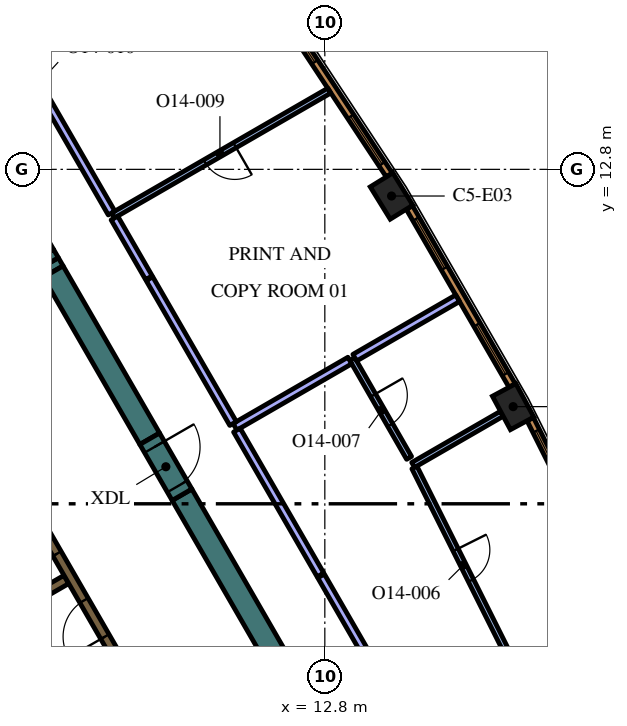
"""IFC4 building model, lengths in metres.
Left out: names, types, materials, properties, quantities, classifications, styles, units other than length and angle.
Written with IfcOpenShell. Run it as: python <this file> out.ifc"""

import sys

from ifc_helpers import new_model, si_unit, direction, frame, frame_2d, origin, origin_2d, place, context, subcontext, project, spatial, polyline, rectangle, outline, extrude, element, fill, save


model = new_model("IFC4")
c1 = context("Model", 3, precision=1e-05, world=origin(), true_north=direction((0.0, 1.0)))
c2 = subcontext(c1, "Body", "Model", "MODEL_VIEW")
j1 = project(units=[si_unit("LENGTHUNIT", "METRE"), si_unit("PLANEANGLEUNIT", "RADIAN")], contexts=[c1])
p1 = place(None, origin())
s1 = spatial("IfcSite", under=j1, at=p1, CompositionType="ELEMENT")
p2 = place(p1, origin())
s2 = spatial("IfcBuilding", under=s1, at=p2, CompositionType="ELEMENT")
p3 = place(p2, frame((0.0, 0.0, 304.8)))
s3 = spatial("IfcBuildingStorey", under=s2, at=p3, CompositionType="ELEMENT", Elevation=304.8)
for number, where, z_axis, x_axis in (
    (1, (17.756, 6.557, 0.0), (0.0, 0.0, 1.0), (-0.474, 0.881, 0.0)),
    (2, (14.556, 12.098, 0.0), (0.0, 0.0, 1.0), (-0.526, 0.851, 0.0)),
):
    element("IfcColumn", number, at=place(p3, frame(where, z_axis=z_axis, x_axis=x_axis)), inside=s3, PredefinedType="COLUMN", context=c2, shape_type="SweptSolid", body=[
        extrude(rectangle(XDim=1.0, YDim=0.7, at=origin_2d()), origin(), (0.0, 0.0, 1.0), 4.2),
    ])
p4 = place(p3, frame((9.042, 4.239, 0.0), z_axis=(0.0, 0.0, 1.0), x_axis=(0.500005785455, -0.866022063525, 0.0)))
e3 = element("IfcWall", 3, at=p4, inside=s3, PredefinedType="SOLIDWALL", context=c2, shape_type="SweptSolid", body=[
    extrude(rectangle(XDim=12.406, YDim=0.6, at=frame_2d((6.203, 0.0))), origin(), (0.0, 0.0, 1.0), 4.2),
])
p5 = place(p3, frame((5.529, 10.324, 0.0), z_axis=(0.0, 0.0, 1.0), x_axis=(0.499122205112, -0.866531606097, 0.0)))
e4 = element("IfcWall", 4, at=p5, inside=s3, PredefinedType="SOLIDWALL", context=c2, shape_type="SweptSolid", body=[
    extrude(rectangle(XDim=0.247, YDim=0.6, at=frame_2d((0.123, 0.0))), origin(), (0.0, 0.0, 1.0), 4.2),
])
p6 = place(p3, frame((1.989, 16.456, 0.0), z_axis=(0.0, 0.0, 1.0), x_axis=(0.499973159588, -0.866040899549, 0.0)))
e5 = element("IfcWall", 5, at=p6, inside=s3, PredefinedType="SOLIDWALL", context=c2, shape_type="SweptSolid", body=[
    extrude(rectangle(XDim=6.828, YDim=0.6, at=frame_2d((3.414, 0.0))), origin(), (0.0, 0.0, 1.0), 4.2),
])
p7 = place(p3, origin())
e6 = element("IfcWall", 6, at=p7, inside=s3, PredefinedType="SOLIDWALL", context=c2, shape_type="SweptSolid", body=[
    extrude(outline(polyline([(5.664, 10.691), (5.788, 10.476), (5.432, 10.271), (5.308, 10.486), (5.664, 10.691)])), origin(), (0.0, 0.0, 1.0), 4.2),
])
p8 = place(p3, frame((8.192, 5.711, 0.0), z_axis=(0.0, 0.0, 1.0), x_axis=(-0.500006836656, 0.866021456604, 0.0)))
e7 = element("IfcWall", 7, at=p8, inside=s3, PredefinedType="SOLIDWALL", context=c2, shape_type="SweptSolid", body=[
    extrude(rectangle(XDim=5.078, YDim=0.6, at=frame_2d((2.539, 0.0))), origin(), (0.0, 0.0, 1.0), 4.2),
])
p9 = place(p3, frame((5.97, -2.591, 0.0), z_axis=(0.0, 0.0, 1.0), x_axis=(-0.499994469932, 0.866028596547, 0.0)))
e8 = element("IfcWall", 8, at=p9, inside=s3, PredefinedType="SOLIDWALL", context=c2, shape_type="SweptSolid", body=[
    extrude(rectangle(XDim=10.488, YDim=0.25, at=frame_2d((5.244, 0.0))), origin(), (0.0, 0.0, 1.0), 4.2),
])
p10 = place(p3, frame((4.094, 0.909, 0.0), z_axis=(0.0, 0.0, 1.0), x_axis=(0.866008176907, 0.50002983664, 0.0)))
e9 = element("IfcWall", 9, at=p10, inside=s3, PredefinedType="SOLIDWALL", context=c2, shape_type="SweptSolid", body=[
    extrude(rectangle(XDim=2.2, YDim=0.25, at=frame_2d((1.1, 0.0))), origin(), (0.0, 0.0, 1.0), 4.2),
])
p11 = place(p3, frame((8.565, -2.185, 0.0), z_axis=(0.0, 0.0, 1.0), x_axis=(-0.499997954832, 0.866026584559, 0.0)))
e10 = element("IfcWall", 10, at=p11, inside=s3, PredefinedType="SOLIDWALL", context=c2, shape_type="SweptSolid", body=[
    extrude(rectangle(XDim=12.35, YDim=0.25, at=frame_2d((6.175, 0.0))), origin(), (0.0, 0.0, 1.0), 4.2),
])
p12 = place(p11, frame((0.685, 0.0, 0.0)))
e11 = element("IfcOpeningElement", 11, at=p12, cuts=e10, PredefinedType="OPENING", context=c2, shape_type="SweptSolid", body=[
    extrude(rectangle(XDim=0.9, YDim=2.1, at=frame_2d((0.45, 1.05))), frame((0.0, 0.135, 0.0), z_axis=(0.0, -1.0, 0.0), x_axis=(1.0, 0.0, 0.0)), (0.0, 0.0, 1.0), 0.27),
])
p13 = place(p11, frame((3.105, 0.0, 0.0)))
e12 = element("IfcOpeningElement", 12, at=p13, cuts=e10, PredefinedType="OPENING", context=c2, shape_type="SweptSolid", body=[
    extrude(rectangle(XDim=1.1, YDim=2.1, at=frame_2d((0.55, 1.05))), frame((0.0, 0.135, 0.0), z_axis=(0.0, -1.0, 0.0), x_axis=(1.0, 0.0, 0.0)), (0.0, 0.0, 1.0), 0.27),
])
p14 = place(p11, frame((5.625, 0.0, 0.0)))
e13 = element("IfcOpeningElement", 13, at=p14, cuts=e10, PredefinedType="OPENING", context=c2, shape_type="SweptSolid", body=[
    extrude(rectangle(XDim=1.1, YDim=2.1, at=frame_2d((0.55, 1.05))), frame((0.0, 0.135, 0.0), z_axis=(0.0, -1.0, 0.0), x_axis=(1.0, 0.0, 0.0)), (0.0, 0.0, 1.0), 0.27),
])
p15 = place(p11, frame((8.145, 0.0, 0.0)))
e14 = element("IfcOpeningElement", 14, at=p15, cuts=e10, PredefinedType="OPENING", context=c2, shape_type="SweptSolid", body=[
    extrude(rectangle(XDim=1.1, YDim=2.1, at=frame_2d((0.55, 1.05))), frame((0.0, 0.135, 0.0), z_axis=(0.0, -1.0, 0.0), x_axis=(1.0, 0.0, 0.0)), (0.0, 0.0, 1.0), 0.27),
])
p16 = place(p11, frame((10.665, 0.0, 0.0)))
e15 = element("IfcOpeningElement", 15, at=p16, cuts=e10, PredefinedType="OPENING", context=c2, shape_type="SweptSolid", body=[
    extrude(rectangle(XDim=1.1, YDim=2.1, at=frame_2d((0.55, 1.05))), frame((0.0, 0.135, 0.0), z_axis=(0.0, -1.0, 0.0), x_axis=(1.0, 0.0, 0.0)), (0.0, 0.0, 1.0), 0.27),
])
p17 = place(p3, frame((8.192, 5.711, 0.0), z_axis=(0.0, 0.0, 1.0), x_axis=(0.500062241894, -0.865989465428, 0.0)))
e16 = element("IfcWall", 16, at=p17, inside=s3, PredefinedType="SOLIDWALL", context=c2, shape_type="SweptSolid", body=[
    extrude(rectangle(XDim=1.7, YDim=0.6, at=frame_2d((0.85, 0.0))), origin(), (0.0, 0.0, 1.0), 4.2),
])
p18 = place(p17, frame((0.25, 0.0, 0.0)))
e17 = element("IfcOpeningElement", 17, at=p18, cuts=e16, PredefinedType="OPENING", context=c2, shape_type="SweptSolid", body=[
    extrude(rectangle(XDim=1.2, YDim=2.1, at=frame_2d((0.6, 1.05))), frame((0.0, 0.31, 0.0), z_axis=(0.0, -1.0, 0.0), x_axis=(1.0, 0.0, 0.0)), (0.0, 0.0, 1.0), 0.62),
])
p19 = place(p3, frame((15.124, 5.022, 0.0), z_axis=(0.0, 0.0, 1.0), x_axis=(0.866010629317, 0.500025589255, 0.0)))
e18 = element("IfcWall", 18, at=p19, inside=s3, PredefinedType="PARTITIONING", context=c2, shape_type="SweptSolid", body=[
    extrude(rectangle(XDim=2.696, YDim=0.15, at=frame_2d((1.348, 0.0))), origin(), (0.0, 0.0, 1.0), 3.55),
])
p20 = place(p3, frame((15.158, 4.955, 0.0), z_axis=(0.0, 0.0, 1.0), x_axis=(0.447465104013, -0.894301392535, 0.0)))
e19 = element("IfcWall", 19, at=p20, inside=s3, PredefinedType="PARTITIONING", context=c2, shape_type="SweptSolid", body=[
    extrude(rectangle(XDim=5.824, YDim=0.15, at=frame_2d((2.912, 0.0))), origin(), (0.0, 0.0, 1.0), 3.55),
])
p21 = place(p20, frame((2.424, 0.0, 0.0)))
e20 = element("IfcOpeningElement", 20, at=p21, cuts=e19, PredefinedType="OPENING", context=c2, shape_type="SweptSolid", body=[
    extrude(rectangle(XDim=0.9, YDim=2.1, at=frame_2d((0.45, 1.05))), frame((0.0, 0.085, 0.0), z_axis=(0.0, -1.0, 0.0), x_axis=(1.0, 0.0, 0.0)), (0.0, 0.0, 1.0), 0.17),
])
p22 = place(p3, frame((13.523, 7.808, 0.0), z_axis=(0.0, 0.0, 1.0), x_axis=(0.498338040698, -0.866982812513, 0.0)))
e21 = element("IfcWall", 21, at=p22, inside=s3, PredefinedType="PARTITIONING", context=c2, shape_type="SweptSolid", body=[
    extrude(rectangle(XDim=2.999, YDim=0.15, at=frame_2d((1.5, 0.0))), origin(), (0.0, 0.0, 1.0), 3.55),
])
p23 = place(p22, frame((1.099, 0.0, 0.0)))
e22 = element("IfcOpeningElement", 22, at=p23, cuts=e21, PredefinedType="OPENING", context=c2, shape_type="SweptSolid", body=[
    extrude(rectangle(XDim=0.9, YDim=2.1, at=frame_2d((0.45, 1.05))), frame((0.0, 0.085, 0.0), z_axis=(0.0, -1.0, 0.0), x_axis=(1.0, 0.0, 0.0)), (0.0, 0.0, 1.0), 0.17),
])
p24 = place(p3, frame((13.588, 7.845, 0.0), z_axis=(0.0, 0.0, 1.0), x_axis=(0.866022959057, 0.500004234368, 0.0)))
e23 = element("IfcWall", 23, at=p24, inside=s3, PredefinedType="PARTITIONING", context=c2, shape_type="SweptSolid", body=[
    extrude(rectangle(XDim=3.125, YDim=0.2, at=frame_2d((1.562, 0.0))), origin(), (0.0, 0.0, 1.0), 3.55),
])
p25 = place(p3, frame((10.436, 6.025, 0.0), z_axis=(0.0, 0.0, 1.0), x_axis=(0.866030664334, 0.49999088835, 0.0)))
e24 = element("IfcWall", 24, at=p25, inside=s3, PredefinedType="PARTITIONING", context=c2, shape_type="SweptSolid", body=[
    extrude(rectangle(XDim=3.49, YDim=0.2, at=frame_2d((1.745, 0.0))), origin(), (0.0, 0.0, 1.0), 3.55),
])
p26 = place(p3, frame((12.686, 2.128, 0.0), z_axis=(0.0, 0.0, 1.0), x_axis=(-0.499988222896, 0.866032203192, 0.0)))
e25 = element("IfcWall", 25, at=p26, inside=s3, PredefinedType="PARTITIONING", context=c2, shape_type="SweptSolid", body=[
    extrude(rectangle(XDim=4.4, YDim=0.2, at=frame_2d((2.2, 0.0))), origin(), (0.0, 0.0, 1.0), 3.55),
])
p27 = place(p3, frame((17.565, -6.324, 0.0), z_axis=(0.0, 0.0, 1.0), x_axis=(-0.499990354792, 0.866030972376, 0.0)))
e26 = element("IfcWall", 26, at=p27, inside=s3, PredefinedType="PARTITIONING", context=c2, shape_type="SweptSolid", body=[
    extrude(rectangle(XDim=9.729, YDim=0.2, at=frame_2d((4.865, 0.0))), origin(), (0.0, 0.0, 1.0), 3.55),
])
p28 = place(p27, frame((4.4, 0.0, 0.0)))
e27 = element("IfcOpeningElement", 27, at=p28, cuts=e26, PredefinedType="OPENING", context=c2, shape_type="SweptSolid", body=[
    extrude(rectangle(XDim=1.0, YDim=2.1, at=frame_2d((0.5, 1.05))), frame((0.0, 0.11, 0.0), z_axis=(0.0, -1.0, 0.0), x_axis=(1.0, 0.0, 0.0)), (0.0, 0.0, 1.0), 0.22),
])
p29 = place(p3, frame((12.918, 14.872, 0.0), z_axis=(0.0, 0.0, 1.0), x_axis=(-0.866033427365, -0.499986102494, 0.0)))
e28 = element("IfcWall", 28, at=p29, inside=s3, PredefinedType="PARTITIONING", context=c2, shape_type="SweptSolid", body=[
    extrude(rectangle(XDim=6.573, YDim=0.15, at=frame_2d((3.287, 0.0))), origin(), (0.0, 0.0, 1.0), 3.55),
])
p30 = place(p29, frame((2.873, 0.0, 0.0)))
e29 = element("IfcOpeningElement", 29, at=p30, cuts=e28, PredefinedType="OPENING", context=c2, shape_type="SweptSolid", body=[
    extrude(rectangle(XDim=0.9, YDim=2.1, at=frame_2d((0.45, 1.05))), frame((0.0, 0.085, 0.0), z_axis=(0.0, -1.0, 0.0), x_axis=(1.0, 0.0, 0.0)), (0.0, 0.0, 1.0), 0.17),
])
p31 = place(p3, frame((10.385, 6.112, 0.0), z_axis=(0.0, 0.0, 1.0), x_axis=(-0.499988222896, 0.866032203192, 0.0)))
e30 = element("IfcWall", 30, at=p31, inside=s3, PredefinedType="PARTITIONING", context=c2, shape_type="SweptSolid", body=[
    extrude(rectangle(XDim=4.4, YDim=0.2, at=frame_2d((2.2, 0.0))), origin(), (0.0, 0.0, 1.0), 3.55),
])
p32 = place(p3, frame((8.171, 9.948, 0.0), z_axis=(0.0, 0.0, 1.0), x_axis=(-0.500044545065, 0.865999684151, 0.0)))
e31 = element("IfcWall", 31, at=p32, inside=s3, PredefinedType="PARTITIONING", context=c2, shape_type="SweptSolid", body=[
    extrude(rectangle(XDim=1.815, YDim=0.2, at=frame_2d((0.908, 0.0))), origin(), (0.0, 0.0, 1.0), 3.55),
])
p33 = place(p3, frame((7.188, 11.65, 0.0), z_axis=(0.0, 0.0, 1.0), x_axis=(-0.499986368499, 0.866033273792, 0.0)))
e32 = element("IfcWall", 32, at=p33, inside=s3, PredefinedType="PARTITIONING", context=c2, shape_type="SweptSolid", body=[
    extrude(rectangle(XDim=7.794, YDim=0.2, at=frame_2d((3.897, 0.0))), origin(), (0.0, 0.0, 1.0), 3.55),
])
p34 = place(p33, frame((3.4, 0.0, 0.0)))
e33 = element("IfcOpeningElement", 33, at=p34, cuts=e32, PredefinedType="OPENING", context=c2, shape_type="SweptSolid", body=[
    extrude(rectangle(XDim=1.0, YDim=2.1, at=frame_2d((0.5, 1.05))), frame((0.0, 0.11, 0.0), z_axis=(0.0, -1.0, 0.0), x_axis=(1.0, 0.0, 0.0)), (0.0, 0.0, 1.0), 0.22),
])
p35 = place(p3, frame((20.625, 1.392, 0.0), z_axis=(0.0, 0.0, 1.0), x_axis=(-0.447484531401, 0.894291671747, 0.0)))
e34 = element("IfcWall", 34, at=p35, inside=s3, PredefinedType="SOLIDWALL", context=c2, shape_type="SweptSolid", body=[
    extrude(rectangle(XDim=5.406, YDim=0.19, at=frame_2d((2.703, 0.0))), origin(), (0.0, 0.0, 1.0), 3.95),
])
p36 = place(p35, frame((0.346, 0.0, 0.6)))
e35 = element("IfcOpeningElement", 35, at=p36, cuts=e34, PredefinedType="OPENING", context=c2, shape_type="SweptSolid", body=[
    extrude(rectangle(XDim=1.5, YDim=2.85, at=frame_2d((0.75, 1.425))), frame((0.0, 0.105, 0.0), z_axis=(0.0, -1.0, 0.0), x_axis=(1.0, 0.0, 0.0)), (0.0, 0.0, 1.0), 0.21),
])
p37 = place(p35, frame((3.559, 0.0, 0.6)))
e36 = element("IfcOpeningElement", 36, at=p37, cuts=e34, PredefinedType="OPENING", context=c2, shape_type="SweptSolid", body=[
    extrude(rectangle(XDim=1.5, YDim=2.85, at=frame_2d((0.75, 1.425))), frame((0.0, 0.105, 0.0), z_axis=(0.0, -1.0, 0.0), x_axis=(1.0, 0.0, 0.0)), (0.0, 0.0, 1.0), 0.21),
])
p38 = place(p3, frame((17.728, 7.114, 0.0), z_axis=(0.0, 0.0, 1.0), x_axis=(-0.500024767483, 0.866011103799, 0.0)))
e37 = element("IfcWall", 37, at=p38, inside=s3, PredefinedType="SOLIDWALL", context=c2, shape_type="SweptSolid", body=[
    extrude(rectangle(XDim=5.406, YDim=0.19, at=frame_2d((2.703, 0.0))), origin(), (0.0, 0.0, 1.0), 3.95),
])
p39 = place(p38, frame((0.346, 0.0, 0.6)))
e38 = element("IfcOpeningElement", 38, at=p39, cuts=e37, PredefinedType="OPENING", context=c2, shape_type="SweptSolid", body=[
    extrude(rectangle(XDim=1.5, YDim=2.85, at=frame_2d((0.75, 1.425))), frame((0.0, 0.105, 0.0), z_axis=(0.0, -1.0, 0.0), x_axis=(1.0, 0.0, 0.0)), (0.0, 0.0, 1.0), 0.21),
])
p40 = place(p38, frame((3.56, 0.0, 0.6)))
e39 = element("IfcOpeningElement", 39, at=p40, cuts=e37, PredefinedType="OPENING", context=c2, shape_type="SweptSolid", body=[
    extrude(rectangle(XDim=1.5, YDim=2.85, at=frame_2d((0.75, 1.425))), frame((0.0, 0.105, 0.0), z_axis=(0.0, -1.0, 0.0), x_axis=(1.0, 0.0, 0.0)), (0.0, 0.0, 1.0), 0.21),
])
p41 = place(p3, frame((14.496, 12.653, 0.0), z_axis=(0.0, 0.0, 1.0), x_axis=(-0.550744054781, 0.83467417962, 0.0)))
e40 = element("IfcWall", 40, at=p41, inside=s3, PredefinedType="SOLIDWALL", context=c2, shape_type="SweptSolid", body=[
    extrude(rectangle(XDim=5.406, YDim=0.19, at=frame_2d((2.703, 0.0))), origin(), (0.0, 0.0, 1.0), 3.95),
])
p42 = place(p41, frame((0.346, 0.0, 0.6)))
e41 = element("IfcOpeningElement", 41, at=p42, cuts=e40, PredefinedType="OPENING", context=c2, shape_type="SweptSolid", body=[
    extrude(rectangle(XDim=1.5, YDim=2.85, at=frame_2d((0.75, 1.425))), frame((0.0, 0.105, 0.0), z_axis=(0.0, -1.0, 0.0), x_axis=(1.0, 0.0, 0.0)), (0.0, 0.0, 1.0), 0.21),
])
p43 = place(p41, frame((3.559, 0.0, 0.6)))
e42 = element("IfcOpeningElement", 42, at=p43, cuts=e40, PredefinedType="OPENING", context=c2, shape_type="SweptSolid", body=[
    extrude(rectangle(XDim=1.5, YDim=2.85, at=frame_2d((0.75, 1.425))), frame((0.0, 0.105, 0.0), z_axis=(0.0, -1.0, 0.0), x_axis=(1.0, 0.0, 0.0)), (0.0, 0.0, 1.0), 0.21),
])
p44 = place(p13, origin())
e43 = element("IfcDoor", 43, at=p44, inside=s3, OperationType="DOUBLE_DOOR_SLIDING", PredefinedType="DOOR", context=c2, shape_type="SweptSolid", body=[
    extrude(rectangle(XDim=1.1, YDim=2.1, at=frame_2d((0.55, 1.05))), frame((0.0, 0.025, 0.0), z_axis=(0.0, -1.0, 0.0), x_axis=(1.0, 0.0, 0.0)), (0.0, 0.0, 1.0), 0.05),
])
fill(e12, e43)
p45 = place(p14, origin())
e44 = element("IfcDoor", 44, at=p45, inside=s3, OperationType="DOUBLE_DOOR_SLIDING", PredefinedType="DOOR", context=c2, shape_type="SweptSolid", body=[
    extrude(rectangle(XDim=1.1, YDim=2.1, at=frame_2d((0.55, 1.05))), frame((0.0, 0.025, 0.0), z_axis=(0.0, -1.0, 0.0), x_axis=(1.0, 0.0, 0.0)), (0.0, 0.0, 1.0), 0.05),
])
fill(e13, e44)
p46 = place(p18, origin())
e45 = element("IfcDoor", 45, at=p46, inside=s3, OperationType="SINGLE_SWING_LEFT", PredefinedType="DOOR", context=c2, shape_type="SweptSolid", body=[
    extrude(rectangle(XDim=1.2, YDim=2.1, at=frame_2d((0.6, 1.05))), frame((0.0, 0.025, 0.0), z_axis=(0.0, -1.0, 0.0), x_axis=(1.0, 0.0, 0.0)), (0.0, 0.0, 1.0), 0.05),
])
fill(e17, e45)
p47 = place(p21, origin())
e46 = element("IfcDoor", 46, at=p47, inside=s3, OperationType="SINGLE_SWING_LEFT", PredefinedType="DOOR", context=c2, shape_type="SweptSolid", body=[
    extrude(rectangle(XDim=0.9, YDim=2.1, at=frame_2d((0.45, 1.05))), frame((0.0, 0.025, 0.0), z_axis=(0.0, -1.0, 0.0), x_axis=(1.0, 0.0, 0.0)), (0.0, 0.0, 1.0), 0.05),
])
fill(e20, e46)
p48 = place(p23, origin())
e47 = element("IfcDoor", 47, at=p48, inside=s3, OperationType="SINGLE_SWING_RIGHT", PredefinedType="DOOR", context=c2, shape_type="SweptSolid", body=[
    extrude(rectangle(XDim=0.9, YDim=2.1, at=frame_2d((0.45, 1.05))), frame((0.0, 0.025, 0.0), z_axis=(0.0, -1.0, 0.0), x_axis=(1.0, 0.0, 0.0)), (0.0, 0.0, 1.0), 0.05),
])
fill(e22, e47)
p49 = place(p30, origin())
e48 = element("IfcDoor", 48, at=p49, inside=s3, OperationType="SINGLE_SWING_RIGHT", PredefinedType="DOOR", context=c2, shape_type="SweptSolid", body=[
    extrude(rectangle(XDim=0.9, YDim=2.1, at=frame_2d((0.45, 1.05))), frame((0.0, 0.025, 0.0), z_axis=(0.0, -1.0, 0.0), x_axis=(1.0, 0.0, 0.0)), (0.0, 0.0, 1.0), 0.05),
])
fill(e29, e48)
p50 = place(p37, origin())
e49 = element("IfcWindow", 49, at=p50, inside=s3, PartitioningType="SINGLE_PANEL", PredefinedType="WINDOW", context=c2, shape_type="SweptSolid", body=[
    extrude(rectangle(XDim=1.5, YDim=2.85, at=frame_2d((0.75, 1.425))), frame((0.0, 0.045, 0.0), z_axis=(0.0, -1.0, 0.0), x_axis=(1.0, 0.0, 0.0)), (0.0, 0.0, 1.0), 0.06),
])
fill(e36, e49)
p51 = place(p39, origin())
e50 = element("IfcWindow", 50, at=p51, inside=s3, PartitioningType="SINGLE_PANEL", PredefinedType="WINDOW", context=c2, shape_type="SweptSolid", body=[
    extrude(rectangle(XDim=1.5, YDim=2.85, at=frame_2d((0.75, 1.425))), frame((0.0, 0.045, 0.0), z_axis=(0.0, -1.0, 0.0), x_axis=(1.0, 0.0, 0.0)), (0.0, 0.0, 1.0), 0.06),
])
fill(e38, e50)
p52 = place(p40, origin())
e51 = element("IfcWindow", 51, at=p52, inside=s3, PartitioningType="SINGLE_PANEL", PredefinedType="WINDOW", context=c2, shape_type="SweptSolid", body=[
    extrude(rectangle(XDim=1.5, YDim=2.85, at=frame_2d((0.75, 1.425))), frame((0.0, 0.045, 0.0), z_axis=(0.0, -1.0, 0.0), x_axis=(1.0, 0.0, 0.0)), (0.0, 0.0, 1.0), 0.06),
])
fill(e39, e51)
p53 = place(p42, origin())
e52 = element("IfcWindow", 52, at=p53, inside=s3, PartitioningType="SINGLE_PANEL", PredefinedType="WINDOW", context=c2, shape_type="SweptSolid", body=[
    extrude(rectangle(XDim=1.5, YDim=2.85, at=frame_2d((0.75, 1.425))), frame((0.0, 0.045, 0.0), z_axis=(0.0, -1.0, 0.0), x_axis=(1.0, 0.0, 0.0)), (0.0, 0.0, 1.0), 0.06),
])
fill(e41, e52)
p54 = place(p43, origin())
e53 = element("IfcWindow", 53, at=p54, inside=s3, PartitioningType="SINGLE_PANEL", PredefinedType="WINDOW", context=c2, shape_type="SweptSolid", body=[
    extrude(rectangle(XDim=1.5, YDim=2.85, at=frame_2d((0.75, 1.425))), frame((0.0, 0.045, 0.0), z_axis=(0.0, -1.0, 0.0), x_axis=(1.0, 0.0, 0.0)), (0.0, 0.0, 1.0), 0.06),
])
fill(e42, e53)
save(model, sys.argv[1])
